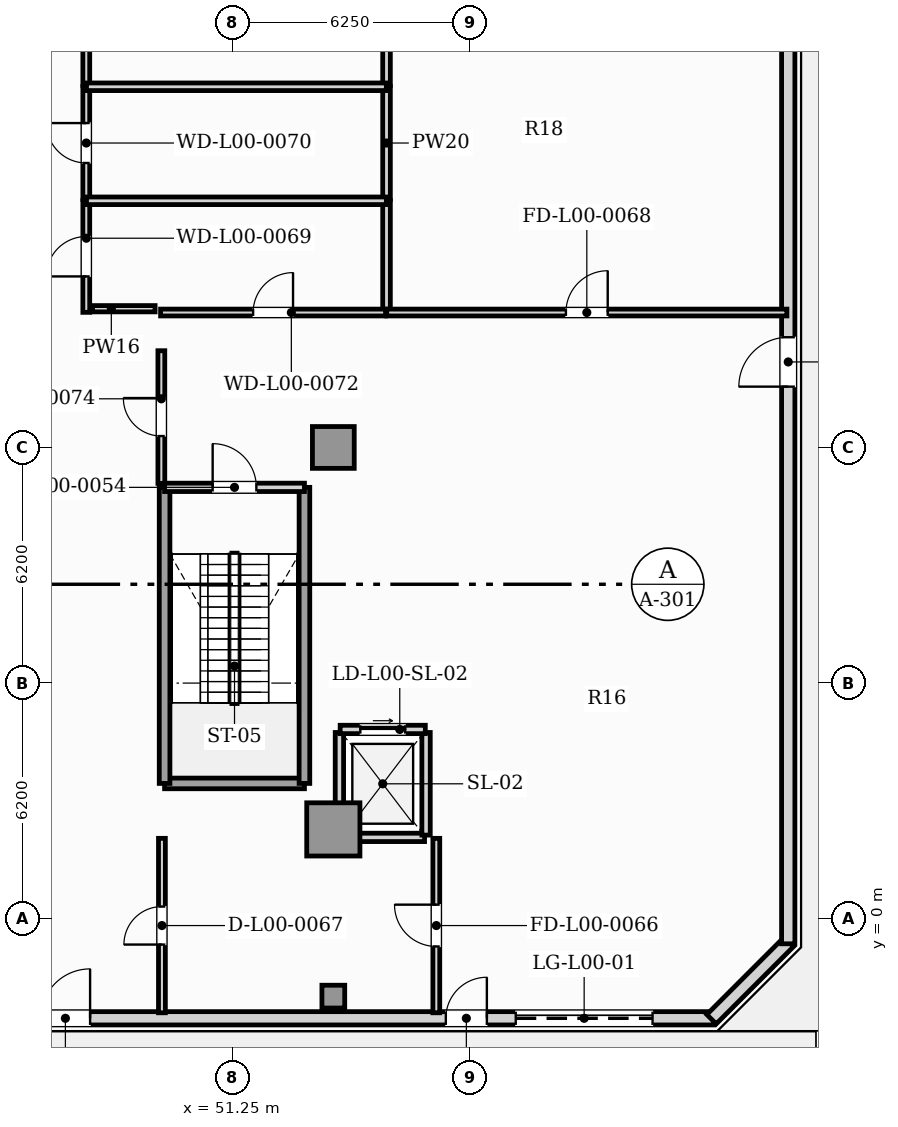
"""IFC4 building model, lengths in metres.
Left out: names, types, materials, properties, quantities, classifications, styles, units other than length and angle.
Written with IfcOpenShell. Run it as: python <this file> out.ifc"""

import sys

from ifc_helpers import new_model, si_unit, direction, frame, frame_2d, origin, origin_2d, place, context, subcontext, project, spatial, rectangle, hollow_rectangle, extrude, element, fill, save


model = new_model("IFC4")
c1 = context("Model", 3, precision=1e-05, world=origin(), true_north=direction((0.0, 1.0)))
c2 = subcontext(c1, "Body", "Model", "MODEL_VIEW")
j1 = project(units=[si_unit("LENGTHUNIT", "METRE"), si_unit("PLANEANGLEUNIT", "RADIAN")], contexts=[c1])
p1 = place(None, origin())
s1 = spatial("IfcSite", under=j1, at=p1, CompositionType="ELEMENT")
p2 = place(p1, origin())
s2 = spatial("IfcBuilding", under=s1, at=p2, CompositionType="ELEMENT")
p3 = place(p2, origin())
s3 = spatial("IfcBuildingStorey", under=s2, at=p3, CompositionType="ELEMENT", Elevation=0.0)
p4 = place(p3, frame((53.9, 2.35, 0.0), z_axis=(0.0, 0.0, 1.0), x_axis=(1.0, 0.0, 0.0)))
e1 = element("IfcColumn", 1, at=p4, inside=s3, PredefinedType="USERDEFINED", context=c2, shape_type="SweptSolid", body=[
    extrude(hollow_rectangle(XDim=1.4, YDim=1.4, WallThickness=0.08, at=origin_2d()), origin(), (0.0, 0.0, 1.0), 5.4),
])
p5 = place(p3, frame((53.9, 12.4, 0.0), z_axis=(0.0, 0.0, 1.0), x_axis=(1.0, 0.0, 0.0)))
e2 = element("IfcColumn", 2, at=p5, inside=s3, PredefinedType="COLUMN", context=c2, shape_type="SweptSolid", body=[
    extrude(rectangle(XDim=1.1, YDim=1.1, at=origin_2d()), origin(), (0.0, 0.0, 1.0), 5.4),
])
p6 = place(p3, frame((53.9, -2.05, 0.0), z_axis=(0.0, 0.0, 1.0), x_axis=(1.0, 0.0, 0.0)))
e3 = element("IfcColumn", 3, at=p6, inside=s3, PredefinedType="COLUMN", context=c2, shape_type="SweptSolid", body=[
    extrude(hollow_rectangle(XDim=0.6, YDim=0.6, WallThickness=0.04, at=origin_2d()), origin(), (0.0, 0.0, 1.0), 5.4),
])
p7 = place(p3, frame((-8.06, -2.62, 0.0), z_axis=(0.0, 0.0, 1.0), x_axis=(1.0, 0.0, 0.0)))
e4 = element("IfcWall", 4, at=p7, inside=s3, PredefinedType="SOLIDWALL", context=c2, shape_type="SweptSolid", body=[
    extrude(rectangle(XDim=71.97, YDim=0.35, at=frame_2d((35.985, 0.0))), origin(), (0.0, 0.0, 1.0), 5.1),
])
p8 = place(p7, frame((18.06, 0.0, 0.0)))
e5 = element("IfcOpeningElement", 5, at=p8, cuts=e4, PredefinedType="OPENING", context=c2, shape_type="SweptSolid", body=[
    extrude(rectangle(XDim=1.3, YDim=2.2, at=frame_2d((0.65, 1.1))), frame((0.0, 0.185, 0.0), z_axis=(0.0, -1.0, 0.0), x_axis=(1.0, 0.0, 0.0)), (0.0, 0.0, 1.0), 0.37),
])
p9 = place(p7, frame((39.91, 0.0, 0.0)))
e6 = element("IfcOpeningElement", 6, at=p9, cuts=e4, PredefinedType="OPENING", context=c2, shape_type="SweptSolid", body=[
    extrude(rectangle(XDim=1.3, YDim=2.2, at=frame_2d((0.65, 1.1))), frame((0.0, 0.185, 0.0), z_axis=(0.0, -1.0, 0.0), x_axis=(1.0, 0.0, 0.0)), (0.0, 0.0, 1.0), 0.37),
])
p10 = place(p7, frame((54.26, 0.0, 0.0)))
e7 = element("IfcOpeningElement", 7, at=p10, cuts=e4, PredefinedType="OPENING", context=c2, shape_type="SweptSolid", body=[
    extrude(rectangle(XDim=1.3, YDim=2.2, at=frame_2d((0.65, 1.1))), frame((0.0, 0.185, 0.0), z_axis=(0.0, -1.0, 0.0), x_axis=(1.0, 0.0, 0.0)), (0.0, 0.0, 1.0), 0.37),
])
p11 = place(p7, frame((66.76, 0.0, 0.0)))
e8 = element("IfcOpeningElement", 8, at=p11, cuts=e4, PredefinedType="OPENING", context=c2, shape_type="SweptSolid", body=[
    extrude(rectangle(XDim=3.6, YDim=3.2, at=frame_2d((1.8, 1.6))), frame((0.0, 0.185, 0.0), z_axis=(0.0, -1.0, 0.0), x_axis=(1.0, 0.0, 0.0)), (0.0, 0.0, 1.0), 0.37),
])
p12 = place(p7, frame((64.92, 0.0, 0.0)))
e9 = element("IfcOpeningElement", 9, at=p12, cuts=e4, PredefinedType="OPENING", context=c2, shape_type="SweptSolid", body=[
    extrude(rectangle(XDim=1.08, YDim=2.25, at=frame_2d((0.54, 1.125))), frame((0.0, 0.185, 0.0), z_axis=(0.0, -1.0, 0.0), x_axis=(1.0, 0.0, 0.0)), (0.0, 0.0, 1.0), 0.37),
])
p13 = place(p3, frame((63.851, -2.644, 0.0), z_axis=(0.0, 0.0, 1.0), x_axis=(0.707106781187, 0.707106781187, 0.0)))
e10 = element("IfcWall", 10, at=p13, inside=s3, PredefinedType="SOLIDWALL", context=c2, shape_type="SweptSolid", body=[
    extrude(rectangle(XDim=2.89, YDim=0.35, at=frame_2d((1.445, 0.0))), origin(), (0.0, 0.0, 1.0), 5.1),
])
p14 = place(p3, frame((65.87, -0.66, 0.0), z_axis=(0.0, 0.0, 1.0), x_axis=(0.0, 1.0, 0.0)))
e11 = element("IfcWall", 11, at=p14, inside=s3, PredefinedType="SOLIDWALL", context=c2, shape_type="SweptSolid", body=[
    extrude(rectangle(XDim=42.37, YDim=0.35, at=frame_2d((21.185, 0.0))), origin(), (0.0, 0.0, 1.0), 4.2),
])
p15 = place(p14, frame((14.66, 0.0, 0.0)))
e12 = element("IfcOpeningElement", 12, at=p15, cuts=e11, PredefinedType="OPENING", context=c2, shape_type="SweptSolid", body=[
    extrude(rectangle(XDim=1.3, YDim=2.2, at=frame_2d((0.65, 1.1))), frame((0.0, 0.185, 0.0), z_axis=(0.0, -1.0, 0.0), x_axis=(1.0, 0.0, 0.0)), (0.0, 0.0, 1.0), 0.37),
])
p16 = place(p14, frame((29.66, 0.0, 0.0)))
e13 = element("IfcOpeningElement", 13, at=p16, cuts=e11, PredefinedType="OPENING", context=c2, shape_type="SweptSolid", body=[
    extrude(rectangle(XDim=2.0, YDim=2.4, at=frame_2d((1.0, 1.2))), frame((0.0, 0.185, 0.0), z_axis=(0.0, -1.0, 0.0), x_axis=(1.0, 0.0, 0.0)), (0.0, 0.0, 1.0), 0.37),
])
p17 = place(p3, frame((54.1, 2.14, 0.0), z_axis=(0.0, 0.0, 1.0), x_axis=(1.0, 0.0, 0.0)))
e14 = element("IfcWall", 14, at=p17, inside=s3, PredefinedType="SOLIDWALL", context=c2, shape_type="SweptSolid", body=[
    extrude(rectangle(XDim=2.2, YDim=0.22, at=frame_2d((1.1, 0.0))), origin(), (0.0, 0.0, 1.0), 5.1),
])
p18 = place(p3, frame((54.06, 2.2, 0.0), z_axis=(0.0, 0.0, 1.0), x_axis=(0.0, 1.0, 0.0)))
e15 = element("IfcWall", 15, at=p18, inside=s3, PredefinedType="SOLIDWALL", context=c2, shape_type="SweptSolid", body=[
    extrude(rectangle(XDim=2.7, YDim=0.22, at=frame_2d((1.35, 0.0))), origin(), (0.0, 0.0, 1.0), 4.483),
])
p19 = place(p3, frame((56.34, 2.2, 0.0), z_axis=(0.0, 0.0, 1.0), x_axis=(0.0, 1.0, 0.0)))
e16 = element("IfcWall", 16, at=p19, inside=s3, PredefinedType="SOLIDWALL", context=c2, shape_type="SweptSolid", body=[
    extrude(rectangle(XDim=2.7, YDim=0.22, at=frame_2d((1.35, 0.0))), origin(), (0.0, 0.0, 1.0), 5.1),
])
p20 = place(p3, frame((54.08, 4.98, 0.0), z_axis=(0.0, 0.0, 1.0), x_axis=(1.0, 0.0, 0.0)))
e17 = element("IfcWall", 17, at=p20, inside=s3, PredefinedType="SOLIDWALL", context=c2, shape_type="SweptSolid", body=[
    extrude(rectangle(XDim=2.24, YDim=0.22, at=frame_2d((1.12, 0.0))), origin(), (0.0, 0.0, 1.0), 5.1),
])
p21 = place(p20, frame((0.53, 0.0, 0.0)))
e18 = element("IfcOpeningElement", 18, at=p21, cuts=e17, PredefinedType="OPENING", context=c2, shape_type="SweptSolid", body=[
    extrude(rectangle(XDim=1.18, YDim=2.2, at=frame_2d((0.59, 1.1))), frame((0.0, 0.12, 0.0), z_axis=(0.0, -1.0, 0.0), x_axis=(1.0, 0.0, 0.0)), (0.0, 0.0, 1.0), 0.24),
])
p22 = place(p3, frame((49.46, 3.56, 0.0), z_axis=(0.0, 0.0, 1.0), x_axis=(1.0, 0.0, 0.0)))
e19 = element("IfcWall", 19, at=p22, inside=s3, PredefinedType="SHEAR", context=c2, shape_type="SweptSolid", body=[
    extrude(rectangle(XDim=3.68, YDim=0.28, at=frame_2d((1.84, 0.0))), origin(), (0.0, 0.0, 1.0), 5.1),
])
for number, where, z_axis, x_axis in (
    (20, (49.46, 3.56, 0.0), (0.0, 0.0, 1.0), (0.0, 1.0, 0.0)),
    (21, (53.14, 3.56, 0.0), (0.0, 0.0, 1.0), (0.0, 1.0, 0.0)),
):
    element("IfcWall", number, at=place(p3, frame(where, z_axis=z_axis, x_axis=x_axis)), inside=s3, PredefinedType="SHEAR", context=c2, shape_type="SweptSolid", body=[
        extrude(rectangle(XDim=7.79, YDim=0.28, at=frame_2d((3.895, 0.0))), origin(), (0.0, 0.0, 1.0), 5.1),
    ])
p23 = place(p3, frame((49.46, 11.35, 0.0), z_axis=(0.0, 0.0, 1.0), x_axis=(1.0, 0.0, 0.0)))
e22 = element("IfcWall", 22, at=p23, inside=s3, PredefinedType="SOLIDWALL", context=c2, shape_type="SweptSolid", body=[
    extrude(rectangle(XDim=3.68, YDim=0.22, at=frame_2d((1.84, 0.0))), origin(), (0.0, 0.0, 1.0), 5.1),
])
p24 = place(p23, frame((1.265, 0.0, 0.0)))
e23 = element("IfcOpeningElement", 23, at=p24, cuts=e22, PredefinedType="OPENING", context=c2, shape_type="SweptSolid", body=[
    extrude(rectangle(XDim=1.15, YDim=2.2, at=frame_2d((0.575, 1.1))), frame((0.0, 0.12, 0.0), z_axis=(0.0, -1.0, 0.0), x_axis=(1.0, 0.0, 0.0)), (0.0, 0.0, 1.0), 0.24),
])
p25 = place(p3, frame((56.61, -2.475, 0.0), z_axis=(0.0, 0.0, 1.0), x_axis=(0.0, 1.0, 0.0)))
e24 = element("IfcWall", 24, at=p25, inside=s3, PredefinedType="PARTITIONING", context=c2, shape_type="SweptSolid", body=[
    extrude(rectangle(XDim=4.59, YDim=0.18, at=frame_2d((2.295, 0.0))), origin(), (0.0, 0.0, 1.0), 5.1),
])
p26 = place(p25, frame((1.745, 0.0, 0.0)))
e25 = element("IfcOpeningElement", 25, at=p26, cuts=e24, PredefinedType="OPENING", context=c2, shape_type="SweptSolid", body=[
    extrude(rectangle(XDim=1.1, YDim=2.2, at=frame_2d((0.55, 1.1))), frame((0.0, 0.1, 0.0), z_axis=(0.0, -1.0, 0.0), x_axis=(1.0, 0.0, 0.0)), (0.0, 0.0, 1.0), 0.2),
])
p27 = place(p3, frame((49.39, -2.475, 0.0), z_axis=(0.0, 0.0, 1.0), x_axis=(0.0, 1.0, 0.0)))
e26 = element("IfcWall", 26, at=p27, inside=s3, PredefinedType="PARTITIONING", context=c2, shape_type="SweptSolid", body=[
    extrude(rectangle(XDim=4.59, YDim=0.18, at=frame_2d((2.295, 0.0))), origin(), (0.0, 0.0, 1.0), 5.1),
])
p28 = place(p27, frame((1.795, 0.0, 0.0)))
e27 = element("IfcOpeningElement", 27, at=p28, cuts=e26, PredefinedType="OPENING", context=c2, shape_type="SweptSolid", body=[
    extrude(rectangle(XDim=1.0, YDim=2.15, at=frame_2d((0.5, 1.075))), frame((0.0, 0.1, 0.0), z_axis=(0.0, -1.0, 0.0), x_axis=(1.0, 0.0, 0.0)), (0.0, 0.0, 1.0), 0.2),
])
p29 = place(p3, frame((55.3, 15.955, 0.0), z_axis=(0.0, 0.0, 1.0), x_axis=(0.0, 1.0, 0.0)))
e28 = element("IfcWall", 28, at=p29, inside=s3, PredefinedType="PARTITIONING", context=c2, shape_type="SweptSolid", body=[
    extrude(rectangle(XDim=2.94, YDim=0.2, at=frame_2d((1.47, 0.0))), origin(), (0.0, 0.0, 1.0), 5.1),
])
for number, where, z_axis, x_axis in (
    (29, (55.3, 18.925, 0.0), (0.0, 0.0, 1.0), (0.0, 1.0, 0.0)),
    (30, (55.3, 21.925, 0.0), (0.0, 0.0, 1.0), (0.0, 1.0, 0.0)),
):
    element("IfcWall", number, at=place(p3, frame(where, z_axis=z_axis, x_axis=x_axis)), inside=s3, PredefinedType="PARTITIONING", context=c2, shape_type="SweptSolid", body=[
        extrude(rectangle(XDim=2.97, YDim=0.2, at=frame_2d((1.485, 0.0))), origin(), (0.0, 0.0, 1.0), 5.1),
    ])
p30 = place(p3, frame((55.305, 15.95, 0.0), z_axis=(0.0, 0.0, 1.0), x_axis=(1.0, 0.0, 0.0)))
e31 = element("IfcWall", 31, at=p30, inside=s3, PredefinedType="PARTITIONING", context=c2, shape_type="SweptSolid", body=[
    extrude(rectangle(XDim=10.53, YDim=0.18, at=frame_2d((5.265, 0.0))), origin(), (0.0, 0.0, 1.0), 5.1),
])
p31 = place(p30, frame((4.715, 0.0, 0.0)))
e32 = element("IfcOpeningElement", 32, at=p31, cuts=e31, PredefinedType="OPENING", context=c2, shape_type="SweptSolid", body=[
    extrude(rectangle(XDim=1.1, YDim=2.2, at=frame_2d((0.55, 1.1))), frame((0.0, 0.1, 0.0), z_axis=(0.0, -1.0, 0.0), x_axis=(1.0, 0.0, 0.0)), (0.0, 0.0, 1.0), 0.2),
])
p32 = place(p3, frame((47.4, 15.955, 0.0), z_axis=(0.0, 0.0, 1.0), x_axis=(0.0, 1.0, 0.0)))
e33 = element("IfcWall", 33, at=p32, inside=s3, PredefinedType="PARTITIONING", context=c2, shape_type="SweptSolid", body=[
    extrude(rectangle(XDim=2.94, YDim=0.18, at=frame_2d((1.47, 0.0))), origin(), (0.0, 0.0, 1.0), 5.1),
])
p33 = place(p32, frame((0.945, 0.0, 0.0)))
e34 = element("IfcOpeningElement", 34, at=p33, cuts=e33, PredefinedType="OPENING", context=c2, shape_type="SweptSolid", body=[
    extrude(rectangle(XDim=1.05, YDim=2.15, at=frame_2d((0.525, 1.075))), frame((0.0, 0.1, 0.0), z_axis=(0.0, -1.0, 0.0), x_axis=(1.0, 0.0, 0.0)), (0.0, 0.0, 1.0), 0.2),
])
p34 = place(p3, frame((47.4, 18.925, 0.0), z_axis=(0.0, 0.0, 1.0), x_axis=(0.0, 1.0, 0.0)))
e35 = element("IfcWall", 35, at=p34, inside=s3, PredefinedType="PARTITIONING", context=c2, shape_type="SweptSolid", body=[
    extrude(rectangle(XDim=2.97, YDim=0.18, at=frame_2d((1.485, 0.0))), origin(), (0.0, 0.0, 1.0), 5.1),
])
p35 = place(p34, frame((0.96, 0.0, 0.0)))
e36 = element("IfcOpeningElement", 36, at=p35, cuts=e35, PredefinedType="OPENING", context=c2, shape_type="SweptSolid", body=[
    extrude(rectangle(XDim=1.05, YDim=2.15, at=frame_2d((0.525, 1.075))), frame((0.0, 0.1, 0.0), z_axis=(0.0, -1.0, 0.0), x_axis=(1.0, 0.0, 0.0)), (0.0, 0.0, 1.0), 0.2),
])
p36 = place(p3, frame((47.4, 21.925, 0.0), z_axis=(0.0, 0.0, 1.0), x_axis=(0.0, 1.0, 0.0)))
e37 = element("IfcWall", 37, at=p36, inside=s3, PredefinedType="PARTITIONING", context=c2, shape_type="SweptSolid", body=[
    extrude(rectangle(XDim=2.97, YDim=0.18, at=frame_2d((1.485, 0.0))), origin(), (0.0, 0.0, 1.0), 5.1),
])
p37 = place(p36, frame((0.96, 0.0, 0.0)))
e38 = element("IfcOpeningElement", 38, at=p37, cuts=e37, PredefinedType="OPENING", context=c2, shape_type="SweptSolid", body=[
    extrude(rectangle(XDim=1.05, YDim=2.15, at=frame_2d((0.525, 1.075))), frame((0.0, 0.1, 0.0), z_axis=(0.0, -1.0, 0.0), x_axis=(1.0, 0.0, 0.0)), (0.0, 0.0, 1.0), 0.2),
])
p38 = place(p3, frame((47.405, 18.89, 0.0), z_axis=(0.0, 0.0, 1.0), x_axis=(1.0, 0.0, 0.0)))
e39 = element("IfcWall", 39, at=p38, inside=s3, PredefinedType="PARTITIONING", context=c2, shape_type="SweptSolid", body=[
    extrude(rectangle(XDim=7.89, YDim=0.2, at=frame_2d((3.945, 0.0))), origin(), (0.0, 0.0, 1.0), 5.1),
])
p39 = place(p3, frame((49.355, 15.95, 0.0), z_axis=(0.0, 0.0, 1.0), x_axis=(1.0, 0.0, 0.0)))
e40 = element("IfcWall", 40, at=p39, inside=s3, PredefinedType="PARTITIONING", context=c2, shape_type="SweptSolid", body=[
    extrude(rectangle(XDim=5.92, YDim=0.18, at=frame_2d((2.96, 0.0))), origin(), (0.0, 0.0, 1.0), 5.1),
])
p40 = place(p39, frame((2.435, 0.0, 0.0)))
e41 = element("IfcOpeningElement", 41, at=p40, cuts=e40, PredefinedType="OPENING", context=c2, shape_type="SweptSolid", body=[
    extrude(rectangle(XDim=1.05, YDim=2.15, at=frame_2d((0.525, 1.075))), frame((0.0, 0.1, 0.0), z_axis=(0.0, -1.0, 0.0), x_axis=(1.0, 0.0, 0.0)), (0.0, 0.0, 1.0), 0.2),
])
p41 = place(p3, frame((47.405, 21.89, 0.0), z_axis=(0.0, 0.0, 1.0), x_axis=(1.0, 0.0, 0.0)))
e42 = element("IfcWall", 42, at=p41, inside=s3, PredefinedType="PARTITIONING", context=c2, shape_type="SweptSolid", body=[
    extrude(rectangle(XDim=7.89, YDim=0.2, at=frame_2d((3.945, 0.0))), origin(), (0.0, 0.0, 1.0), 5.1),
])
p42 = place(p3, frame((49.375, 11.455, 0.0), z_axis=(0.0, 0.0, 1.0), x_axis=(0.0, 1.0, 0.0)))
e43 = element("IfcWall", 43, at=p42, inside=s3, PredefinedType="PARTITIONING", context=c2, shape_type="SweptSolid", body=[
    extrude(rectangle(XDim=3.49, YDim=0.18, at=frame_2d((1.745, 0.0))), origin(), (0.0, 0.0, 1.0), 5.1),
])
p43 = place(p42, frame((1.245, 0.0, 0.0)))
e44 = element("IfcOpeningElement", 44, at=p43, cuts=e43, PredefinedType="OPENING", context=c2, shape_type="SweptSolid", body=[
    extrude(rectangle(XDim=1.0, YDim=2.15, at=frame_2d((0.5, 1.075))), frame((0.0, 0.1, 0.0), z_axis=(0.0, -1.0, 0.0), x_axis=(1.0, 0.0, 0.0)), (0.0, 0.0, 1.0), 0.2),
])
p44 = place(p3, frame((47.565, 16.05, 0.0), z_axis=(0.0, 0.0, 1.0), x_axis=(1.0, 0.0, 0.0)))
e45 = element("IfcWall", 45, at=p44, inside=s3, PredefinedType="PLUMBINGWALL", context=c2, shape_type="SweptSolid", body=[
    extrude(rectangle(XDim=1.645, YDim=0.165, at=frame_2d((0.823, 0.0))), origin(), (0.0, 0.0, 1.0), 5.1),
])
p45 = place(p10, frame((1.3, 0.0, 0.0), z_axis=(0.0, 0.0, 1.0), x_axis=(-1.0, 0.0, 0.0)))
e46 = element("IfcDoor", 46, at=p45, inside=s3, OperationType="SINGLE_SWING_LEFT", PredefinedType="DOOR", context=c2, shape_type="SweptSolid", body=[
    extrude(rectangle(XDim=1.3, YDim=2.2, at=frame_2d((0.65, 1.1))), frame((0.0, 0.025, 0.0), z_axis=(0.0, -1.0, 0.0), x_axis=(1.0, 0.0, 0.0)), (0.0, 0.0, 1.0), 0.05),
])
fill(e7, e46)
p46 = place(p11, frame((3.6, 0.0, 0.0), z_axis=(0.0, 0.0, 1.0), x_axis=(-1.0, 0.0, 0.0)))
e47 = element("IfcDoor", 47, at=p46, inside=s3, OperationType="ROLLINGUP", PredefinedType="GATE", context=c2, shape_type="SweptSolid", body=[
    extrude(rectangle(XDim=3.6, YDim=3.2, at=frame_2d((1.8, 1.6))), frame((0.0, 0.025, 0.0), z_axis=(0.0, -1.0, 0.0), x_axis=(1.0, 0.0, 0.0)), (0.0, 0.0, 1.0), 0.05),
])
fill(e8, e47)
p47 = place(p12, frame((1.08, 0.0, 0.0), z_axis=(0.0, 0.0, 1.0), x_axis=(-1.0, 0.0, 0.0)))
e48 = element("IfcDoor", 48, at=p47, inside=s3, OperationType="SINGLE_SWING_LEFT", PredefinedType="DOOR", context=c2, shape_type="SweptSolid", body=[
    extrude(rectangle(XDim=1.08, YDim=2.25, at=frame_2d((0.54, 1.125))), frame((0.0, 0.025, 0.0), z_axis=(0.0, -1.0, 0.0), x_axis=(1.0, 0.0, 0.0)), (0.0, 0.0, 1.0), 0.05),
])
fill(e9, e48)
p48 = place(p15, frame((1.3, 0.0, 0.0), z_axis=(0.0, 0.0, 1.0), x_axis=(-1.0, 0.0, 0.0)))
e49 = element("IfcDoor", 49, at=p48, inside=s3, OperationType="SINGLE_SWING_RIGHT", PredefinedType="DOOR", context=c2, shape_type="SweptSolid", body=[
    extrude(rectangle(XDim=1.3, YDim=2.2, at=frame_2d((0.65, 1.1))), frame((0.0, 0.025, 0.0), z_axis=(0.0, -1.0, 0.0), x_axis=(1.0, 0.0, 0.0)), (0.0, 0.0, 1.0), 0.05),
])
fill(e12, e49)
p49 = place(p21, origin())
e50 = element("IfcDoor", 50, at=p49, inside=s3, OperationType="SLIDING_TO_RIGHT", PredefinedType="DOOR", context=c2, shape_type="SweptSolid", body=[
    extrude(rectangle(XDim=1.18, YDim=2.2, at=frame_2d((0.59, 1.1))), frame((0.0, 0.025, 0.0), z_axis=(0.0, -1.0, 0.0), x_axis=(1.0, 0.0, 0.0)), (0.0, 0.0, 1.0), 0.05),
])
fill(e18, e50)
p50 = place(p24, origin())
e51 = element("IfcDoor", 51, at=p50, inside=s3, OperationType="SINGLE_SWING_LEFT", PredefinedType="DOOR", context=c2, shape_type="SweptSolid", body=[
    extrude(rectangle(XDim=1.15, YDim=2.2, at=frame_2d((0.575, 1.1))), frame((0.0, 0.025, 0.0), z_axis=(0.0, -1.0, 0.0), x_axis=(1.0, 0.0, 0.0)), (0.0, 0.0, 1.0), 0.05),
])
fill(e23, e51)
p51 = place(p26, origin())
e52 = element("IfcDoor", 52, at=p51, inside=s3, OperationType="SINGLE_SWING_RIGHT", PredefinedType="DOOR", context=c2, shape_type="SweptSolid", body=[
    extrude(rectangle(XDim=1.1, YDim=2.2, at=frame_2d((0.55, 1.1))), frame((0.0, 0.025, 0.0), z_axis=(0.0, -1.0, 0.0), x_axis=(1.0, 0.0, 0.0)), (0.0, 0.0, 1.0), 0.05),
])
fill(e25, e52)
p52 = place(p28, origin())
e53 = element("IfcDoor", 53, at=p52, inside=s3, OperationType="SINGLE_SWING_LEFT", PredefinedType="DOOR", context=c2, shape_type="SweptSolid", body=[
    extrude(rectangle(XDim=1.0, YDim=2.15, at=frame_2d((0.5, 1.075))), frame((0.0, 0.025, 0.0), z_axis=(0.0, -1.0, 0.0), x_axis=(1.0, 0.0, 0.0)), (0.0, 0.0, 1.0), 0.05),
])
fill(e27, e53)
p53 = place(p31, origin())
e54 = element("IfcDoor", 54, at=p53, inside=s3, OperationType="SINGLE_SWING_RIGHT", PredefinedType="DOOR", context=c2, shape_type="SweptSolid", body=[
    extrude(rectangle(XDim=1.1, YDim=2.2, at=frame_2d((0.55, 1.1))), frame((0.0, 0.025, 0.0), z_axis=(0.0, -1.0, 0.0), x_axis=(1.0, 0.0, 0.0)), (0.0, 0.0, 1.0), 0.05),
])
fill(e32, e54)
p54 = place(p33, origin())
e55 = element("IfcDoor", 55, at=p54, inside=s3, OperationType="SINGLE_SWING_LEFT", PredefinedType="DOOR", context=c2, shape_type="SweptSolid", body=[
    extrude(rectangle(XDim=1.05, YDim=2.15, at=frame_2d((0.525, 1.075))), frame((0.0, 0.025, 0.0), z_axis=(0.0, -1.0, 0.0), x_axis=(1.0, 0.0, 0.0)), (0.0, 0.0, 1.0), 0.05),
])
fill(e34, e55)
p55 = place(p35, origin())
e56 = element("IfcDoor", 56, at=p55, inside=s3, OperationType="SINGLE_SWING_RIGHT", PredefinedType="DOOR", context=c2, shape_type="SweptSolid", body=[
    extrude(rectangle(XDim=1.05, YDim=2.15, at=frame_2d((0.525, 1.075))), frame((0.0, 0.025, 0.0), z_axis=(0.0, -1.0, 0.0), x_axis=(1.0, 0.0, 0.0)), (0.0, 0.0, 1.0), 0.05),
])
fill(e36, e56)
p56 = place(p40, origin())
e57 = element("IfcDoor", 57, at=p56, inside=s3, OperationType="SINGLE_SWING_RIGHT", PredefinedType="DOOR", context=c2, shape_type="SweptSolid", body=[
    extrude(rectangle(XDim=1.05, YDim=2.15, at=frame_2d((0.525, 1.075))), frame((0.0, 0.025, 0.0), z_axis=(0.0, -1.0, 0.0), x_axis=(1.0, 0.0, 0.0)), (0.0, 0.0, 1.0), 0.05),
])
fill(e41, e57)
p57 = place(p43, origin())
e58 = element("IfcDoor", 58, at=p57, inside=s3, OperationType="SINGLE_SWING_RIGHT", PredefinedType="DOOR", context=c2, shape_type="SweptSolid", body=[
    extrude(rectangle(XDim=1.0, YDim=2.15, at=frame_2d((0.5, 1.075))), frame((0.0, 0.025, 0.0), z_axis=(0.0, -1.0, 0.0), x_axis=(1.0, 0.0, 0.0)), (0.0, 0.0, 1.0), 0.05),
])
fill(e44, e58)
save(model, sys.argv[1])
